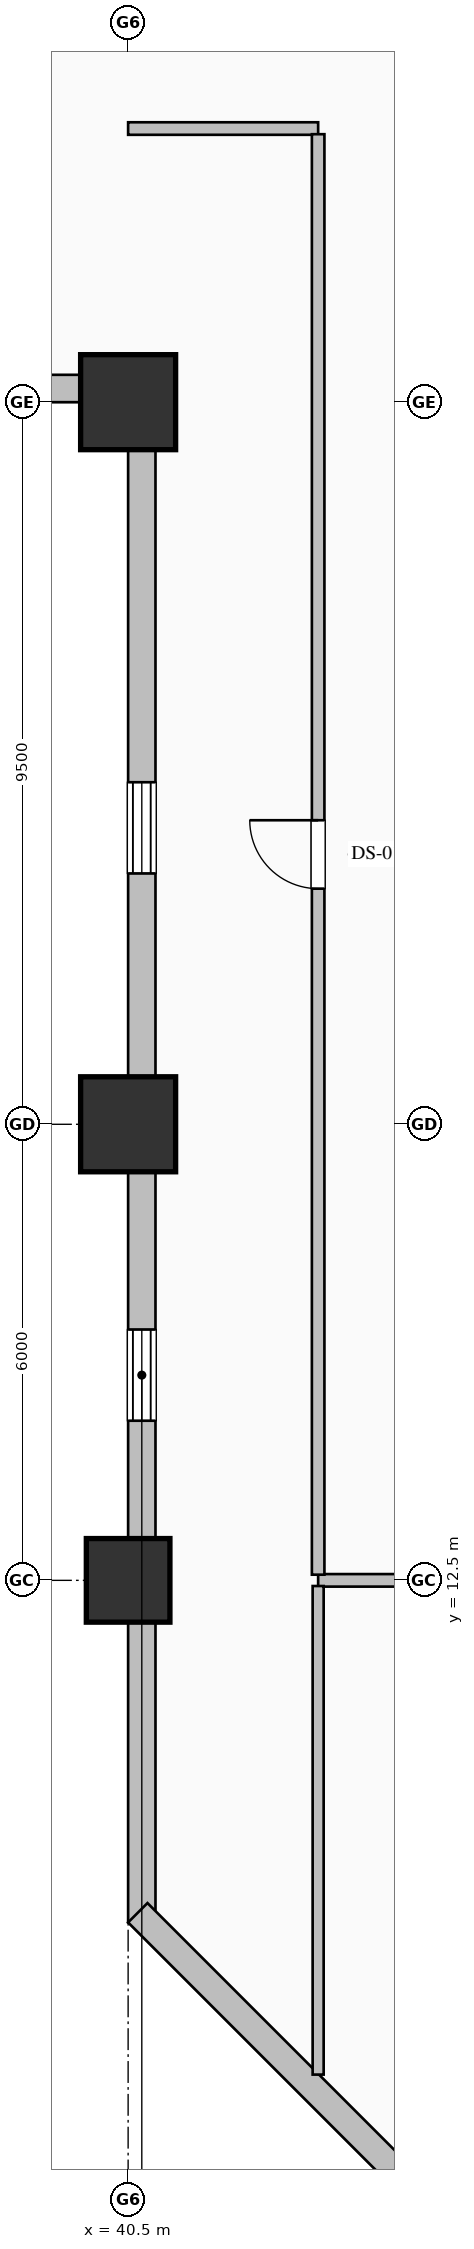
"""IFC4 building model, lengths in metres.
Left out: names, types, materials, properties, quantities, classifications, styles, units other than length and angle.
Written with IfcOpenShell. Run it as: python <this file> out.ifc"""

import sys

from ifc_helpers import new_model, si_unit, direction, frame, frame_2d, origin, origin_2d, place, context, subcontext, project, spatial, rectangle, hollow_rectangle, extrude, element, fill, save


model = new_model("IFC4")
c1 = context("Model", 3, precision=1e-05, world=origin(), true_north=direction((0.0, 1.0)))
c2 = subcontext(c1, "Body", "Model", "MODEL_VIEW")
j1 = project(units=[si_unit("LENGTHUNIT", "METRE"), si_unit("PLANEANGLEUNIT", "RADIAN")], contexts=[c1])
p1 = place(None, origin())
s1 = spatial("IfcSite", under=j1, at=p1, CompositionType="ELEMENT")
p2 = place(p1, origin())
s2 = spatial("IfcBuilding", under=s1, at=p2, CompositionType="ELEMENT")
p3 = place(p2, frame((0.0, 0.0, 84.2)))
s3 = spatial("IfcBuildingStorey", under=s2, at=p3, CompositionType="ELEMENT", Elevation=84.2)
p4 = place(p3, frame((40.5, 12.5, 0.0), z_axis=(0.0, 0.0, 1.0), x_axis=(1.0, 0.0, 0.0)))
e1 = element("IfcColumn", 1, at=p4, inside=s3, PredefinedType="COLUMN", context=c2, shape_type="SweptSolid", body=[
    extrude(hollow_rectangle(XDim=1.1, YDim=1.1, WallThickness=0.04, at=origin_2d()), origin(), (0.0, 0.0, 1.0), 4.0),
])
for number, where, z_axis, x_axis in (
    (2, (40.5, 18.5, 0.0), (0.0, 0.0, 1.0), (1.0, 0.0, 0.0)),
    (3, (40.5, 28.0, 0.0), (0.0, 0.0, 1.0), (1.0, 0.0, 0.0)),
):
    element("IfcColumn", number, at=place(p3, frame(where, z_axis=z_axis, x_axis=x_axis)), inside=s3, PredefinedType="COLUMN", context=c2, shape_type="SweptSolid", body=[
        extrude(hollow_rectangle(XDim=1.25, YDim=1.25, WallThickness=0.045, at=origin_2d()), origin(), (0.0, 0.0, 1.0), 4.0),
    ])
p5 = place(p3, frame((40.68, 8.0, 0.0), z_axis=(0.0, 0.0, 1.0), x_axis=(0.0, 1.0, 0.0)))
e4 = element("IfcWall", 4, at=p5, inside=s3, PredefinedType="SOLIDWALL", context=c2, shape_type="SweptSolid", body=[
    extrude(rectangle(XDim=20.36, YDim=0.36, at=frame_2d((10.18, 0.0))), origin(), (0.0, 0.0, 1.0), 3.05),
])
p6 = place(p5, frame((6.6, 0.0, 0.7)))
e5 = element("IfcOpeningElement", 5, at=p6, cuts=e4, PredefinedType="OPENING", context=c2, shape_type="SweptSolid", body=[
    extrude(rectangle(XDim=1.2, YDim=1.85, at=frame_2d((0.6, 0.925))), frame((0.0, 0.19, 0.0), z_axis=(0.0, -1.0, 0.0), x_axis=(1.0, 0.0, 0.0)), (0.0, 0.0, 1.0), 0.38),
])
p7 = place(p5, frame((13.8, 0.0, 0.7)))
e6 = element("IfcOpeningElement", 6, at=p7, cuts=e4, PredefinedType="OPENING", context=c2, shape_type="SweptSolid", body=[
    extrude(rectangle(XDim=1.2, YDim=1.85, at=frame_2d((0.6, 0.925))), frame((0.0, 0.19, 0.0), z_axis=(0.0, -1.0, 0.0), x_axis=(1.0, 0.0, 0.0)), (0.0, 0.0, 1.0), 0.38),
])
p8 = place(p3, frame((40.52, 28.18, 0.0), z_axis=(0.0, 0.0, 1.0), x_axis=(-1.0, 0.0, 0.0)))
e7 = element("IfcWall", 7, at=p8, inside=s3, PredefinedType="SOLIDWALL", context=c2, shape_type="SweptSolid", body=[
    extrude(rectangle(XDim=36.52, YDim=0.36, at=frame_2d((18.26, 0.0))), origin(), (0.0, 0.0, 1.0), 3.05),
])
p9 = place(p8, frame((10.2, 0.0, 0.7)))
e8 = element("IfcOpeningElement", 8, at=p9, cuts=e7, PredefinedType="OPENING", context=c2, shape_type="SweptSolid", body=[
    extrude(rectangle(XDim=1.2, YDim=1.85, at=frame_2d((0.6, 0.925))), frame((0.0, 0.19, 0.0), z_axis=(0.0, -1.0, 0.0), x_axis=(1.0, 0.0, 0.0)), (0.0, 0.0, 1.0), 0.38),
])
p10 = place(p8, frame((17.4, 0.0, 0.7)))
e9 = element("IfcOpeningElement", 9, at=p10, cuts=e7, PredefinedType="OPENING", context=c2, shape_type="SweptSolid", body=[
    extrude(rectangle(XDim=1.2, YDim=1.85, at=frame_2d((0.6, 0.925))), frame((0.0, 0.19, 0.0), z_axis=(0.0, -1.0, 0.0), x_axis=(1.0, 0.0, 0.0)), (0.0, 0.0, 1.0), 0.38),
])
p11 = place(p8, frame((21.0, 0.0, 0.7)))
e10 = element("IfcOpeningElement", 10, at=p11, cuts=e7, PredefinedType="OPENING", context=c2, shape_type="SweptSolid", body=[
    extrude(rectangle(XDim=1.2, YDim=1.85, at=frame_2d((0.6, 0.925))), frame((0.0, 0.19, 0.0), z_axis=(0.0, -1.0, 0.0), x_axis=(1.0, 0.0, 0.0)), (0.0, 0.0, 1.0), 0.38),
])
p12 = place(p8, frame((28.2, 0.0, 0.7)))
e11 = element("IfcOpeningElement", 11, at=p12, cuts=e7, PredefinedType="OPENING", context=c2, shape_type="SweptSolid", body=[
    extrude(rectangle(XDim=1.2, YDim=1.85, at=frame_2d((0.6, 0.925))), frame((0.0, 0.19, 0.0), z_axis=(0.0, -1.0, 0.0), x_axis=(1.0, 0.0, 0.0)), (0.0, 0.0, 1.0), 0.38),
])
p13 = place(p3, frame((44.627, 4.127, 0.0), z_axis=(0.0, 0.0, 1.0), x_axis=(-0.707106781187, 0.707106781187, 0.0)))
e12 = element("IfcWall", 12, at=p13, inside=s3, PredefinedType="SOLIDWALL", context=c2, shape_type="SweptSolid", body=[
    extrude(rectangle(XDim=5.657, YDim=0.36, at=frame_2d((2.828, 0.0))), origin(), (0.0, 0.0, 1.0), 3.75),
])
p14 = place(p3, frame((43.0, 31.6, 0.0), z_axis=(0.0, 0.0, 1.0), x_axis=(-1.0, 0.0, 0.0)))
e13 = element("IfcWall", 13, at=p14, inside=s3, PredefinedType="PARTITIONING", context=c2, shape_type="SweptSolid", body=[
    extrude(rectangle(XDim=2.5, YDim=0.165, at=frame_2d((1.25, 0.0))), origin(), (0.0, 0.0, 1.0), 3.75),
])
p15 = place(p3, frame((45.2, 12.5, 0.0), z_axis=(0.0, 0.0, 1.0), x_axis=(-1.0, 0.0, 0.0)))
e14 = element("IfcWall", 14, at=p15, inside=s3, PredefinedType="PARTITIONING", context=c2, shape_type="SweptSolid", body=[
    extrude(rectangle(XDim=2.2, YDim=0.165, at=frame_2d((1.1, 0.0))), origin(), (0.0, 0.0, 1.0), 3.042),
])
p16 = place(p3, frame((43.0, 12.574, 0.0), z_axis=(0.0, 0.0, 1.0), x_axis=(0.0, 1.0, 0.0)))
e15 = element("IfcWall", 15, at=p16, inside=s3, PredefinedType="PARTITIONING", context=c2, shape_type="SweptSolid", body=[
    extrude(rectangle(XDim=18.951, YDim=0.165, at=frame_2d((9.476, 0.0))), origin(), (0.0, 0.0, 1.0), 3.75),
])
p17 = place(p16, frame((9.025, 0.0, 0.0)))
e16 = element("IfcOpeningElement", 16, at=p17, cuts=e15, PredefinedType="OPENING", context=c2, shape_type="SweptSolid", body=[
    extrude(rectangle(XDim=0.9, YDim=2.15, at=frame_2d((0.45, 1.075))), frame((0.0, 0.093, 0.0), z_axis=(0.0, -1.0, 0.0), x_axis=(1.0, 0.0, 0.0)), (0.0, 0.0, 1.0), 0.185),
])
p18 = place(p3, frame((43.0, 5.998, 0.0), z_axis=(0.0, 0.0, 1.0), x_axis=(0.0, 1.0, 0.0)))
e17 = element("IfcWall", 17, at=p18, inside=s3, PredefinedType="PARTITIONING", context=c2, shape_type="SweptSolid", body=[
    extrude(rectangle(XDim=6.428, YDim=0.145, at=frame_2d((3.214, 0.0))), origin(), (0.0, 0.0, 1.0), 3.75),
])
p19 = place(p6, origin())
e18 = element("IfcWindow", 18, at=p19, inside=s3, PartitioningType="DOUBLE_PANEL_VERTICAL", PredefinedType="WINDOW", context=c2, shape_type="SweptSolid", body=[
    extrude(rectangle(XDim=1.2, YDim=1.85, at=frame_2d((0.6, 0.925))), frame((0.0, 0.15, 0.0), z_axis=(0.0, -1.0, 0.0), x_axis=(1.0, 0.0, 0.0)), (0.0, 0.0, 1.0), 0.06),
])
fill(e5, e18)
p20 = place(p7, origin())
e19 = element("IfcWindow", 19, at=p20, inside=s3, PartitioningType="DOUBLE_PANEL_VERTICAL", PredefinedType="WINDOW", context=c2, shape_type="SweptSolid", body=[
    extrude(rectangle(XDim=1.2, YDim=1.85, at=frame_2d((0.6, 0.925))), frame((0.0, 0.15, 0.0), z_axis=(0.0, -1.0, 0.0), x_axis=(1.0, 0.0, 0.0)), (0.0, 0.0, 1.0), 0.06),
])
fill(e6, e19)
p21 = place(p17, origin())
e20 = element("IfcDoor", 20, at=p21, inside=s3, OperationType="SINGLE_SWING_RIGHT", PredefinedType="DOOR", context=c2, shape_type="SweptSolid", body=[
    extrude(rectangle(XDim=0.9, YDim=2.15, at=frame_2d((0.45, 1.075))), frame((0.0, 0.025, 0.0), z_axis=(0.0, -1.0, 0.0), x_axis=(1.0, 0.0, 0.0)), (0.0, 0.0, 1.0), 0.05),
])
fill(e16, e20)
save(model, sys.argv[1])
